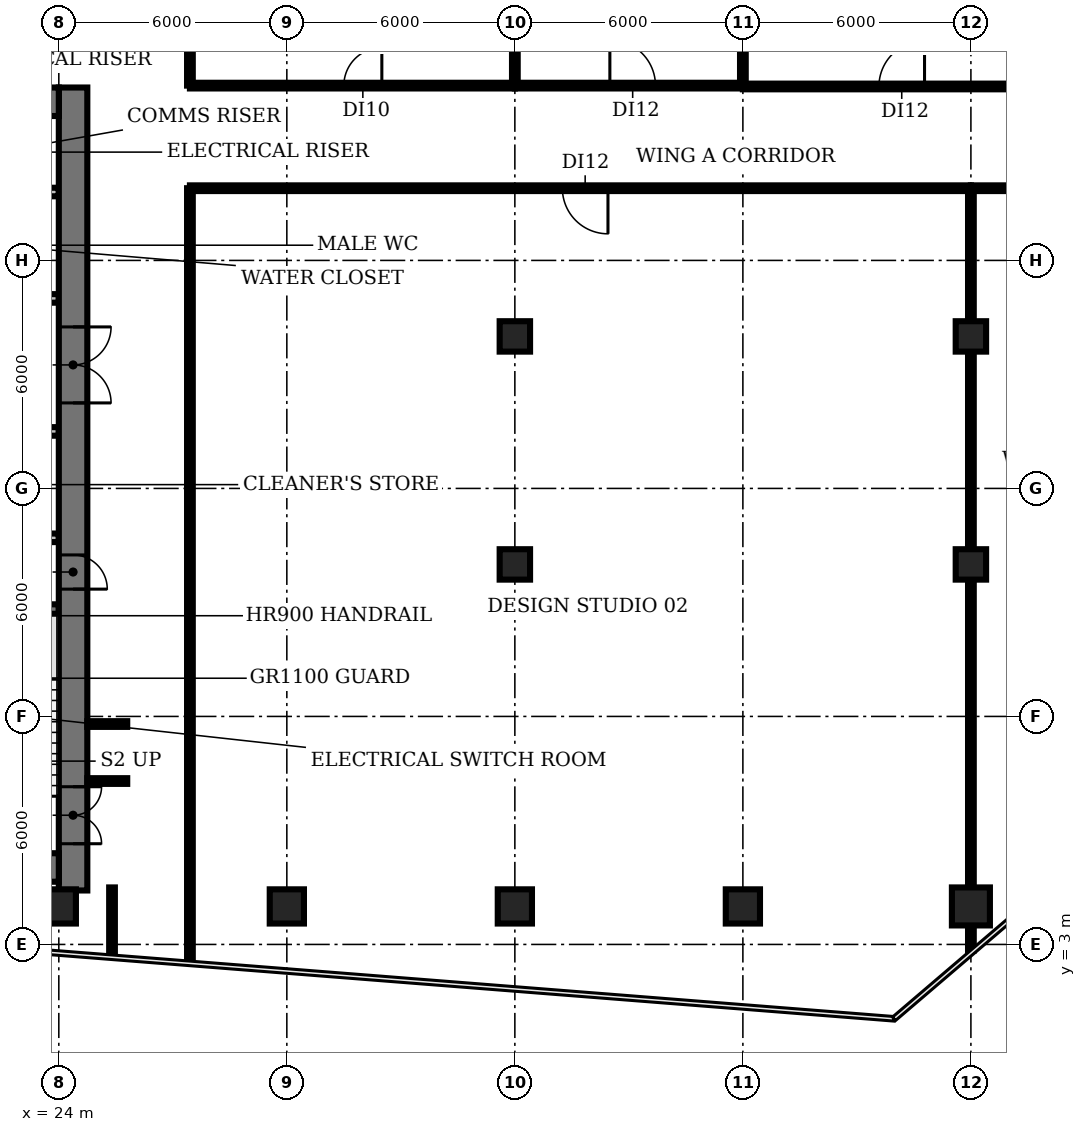
"""IFC4 building model, lengths in metres.
Left out: names, types, materials, properties, quantities, classifications, styles, units other than length and angle.
Written with IfcOpenShell. Run it as: python <this file> out.ifc"""

import sys

from ifc_helpers import new_model, si_unit, direction, frame, frame_2d, origin, origin_2d, place, context, subcontext, project, spatial, rectangle, circle, extrude, element, fill, save


model = new_model("IFC4")
c1 = context("Model", 3, precision=1e-05, world=origin(), true_north=direction((0.0, 1.0)))
c2 = subcontext(c1, "Body", "Model", "MODEL_VIEW")
j1 = project(units=[si_unit("LENGTHUNIT", "METRE"), si_unit("PLANEANGLEUNIT", "RADIAN")], contexts=[c1])
p1 = place(None, origin())
s1 = spatial("IfcSite", under=j1, at=p1, CompositionType="ELEMENT")
p2 = place(p1, origin())
s2 = spatial("IfcBuilding", under=s1, at=p2, CompositionType="ELEMENT")
p3 = place(p2, frame((0.0, 0.0, 129.8)))
s3 = spatial("IfcBuildingStorey", under=s2, at=p3, CompositionType="ELEMENT", Elevation=129.8)
for number, where, z_axis, x_axis in (
    (1, (24.0, 4.0, 0.0), (0.0, 0.0, 1.0), (1.0, 0.0, 0.0)),
    (2, (30.0, 4.0, 0.0), (0.0, 0.0, 1.0), (1.0, 0.0, 0.0)),
    (3, (36.0, 4.0, 0.0), (0.0, 0.0, 1.0), (1.0, 0.0, 0.0)),
):
    element("IfcColumn", number, at=place(p3, frame(where, z_axis=z_axis, x_axis=x_axis)), inside=s3, PredefinedType="COLUMN", context=c2, shape_type="SweptSolid", body=[
        extrude(rectangle(XDim=0.9, YDim=0.9, at=origin_2d()), origin(), (0.0, 0.0, 1.0), 3.85),
    ])
for number, where, z_axis, x_axis in (
    (4, (36.0, 13.0, 0.0), (0.0, 0.0, 1.0), (1.0, 0.0, 0.0)),
    (5, (36.0, 19.0, 0.0), (0.0, 0.0, 1.0), (1.0, 0.0, 0.0)),
):
    element("IfcColumn", number, at=place(p3, frame(where, z_axis=z_axis, x_axis=x_axis)), inside=s3, PredefinedType="COLUMN", context=c2, shape_type="SweptSolid", body=[
        extrude(rectangle(XDim=0.8, YDim=0.8, at=origin_2d()), origin(), (0.0, 0.0, 1.0), 3.85),
    ])
p4 = place(p3, frame((42.0, 4.0, 0.0), z_axis=(0.0, 0.0, 1.0), x_axis=(1.0, 0.0, 0.0)))
e6 = element("IfcColumn", 6, at=p4, inside=s3, PredefinedType="COLUMN", context=c2, shape_type="SweptSolid", body=[
    extrude(rectangle(XDim=0.9, YDim=0.9, at=origin_2d()), origin(), (0.0, 0.0, 1.0), 3.85),
])
p5 = place(p3, frame((48.0, 4.0, 0.0), z_axis=(0.0, 0.0, 1.0), x_axis=(1.0, 0.0, 0.0)))
e7 = element("IfcColumn", 7, at=p5, inside=s3, PredefinedType="COLUMN", context=c2, shape_type="SweptSolid", body=[
    extrude(circle(Radius=0.5, at=origin_2d()), origin(), (0.0, 0.0, 1.0), 3.85),
])
for number, where, z_axis, x_axis in (
    (8, (48.0, 13.0, 0.0), (0.0, 0.0, 1.0), (1.0, 0.0, 0.0)),
    (9, (48.0, 19.0, 0.0), (0.0, 0.0, 1.0), (1.0, 0.0, 0.0)),
):
    element("IfcColumn", number, at=place(p3, frame(where, z_axis=z_axis, x_axis=x_axis)), inside=s3, PredefinedType="COLUMN", context=c2, shape_type="SweptSolid", body=[
        extrude(rectangle(XDim=0.8, YDim=0.8, at=origin_2d()), origin(), (0.0, 0.0, 1.0), 3.85),
    ])
p6 = place(p3, frame((20.85, 11.825, 0.0), z_axis=(0.0, 0.0, 1.0), x_axis=(1.0, 0.0, 0.0)))
e10 = element("IfcWall", 10, at=p6, inside=s3, PredefinedType="SHEAR", context=c2, shape_type="SweptSolid", body=[
    extrude(rectangle(XDim=3.15, YDim=0.25, at=frame_2d((1.575, 0.0))), origin(), (0.0, 0.0, 1.0), 3.85),
])
p7 = place(p3, frame((16.6, 13.7, 0.0), z_axis=(0.0, 0.0, 1.0), x_axis=(1.0, 0.0, 0.0)))
e11 = element("IfcWall", 11, at=p7, inside=s3, PredefinedType="PARTITIONING", context=c2, shape_type="SweptSolid", body=[
    extrude(rectangle(XDim=7.4, YDim=0.225, at=frame_2d((3.7, 0.0))), origin(), (0.0, 0.0, 1.0), 3.85),
])
p8 = place(p3, frame((9.4, 16.5, 0.0), z_axis=(0.0, 0.0, 1.0), x_axis=(1.0, 0.0, 0.0)))
e12 = element("IfcWall", 12, at=p8, inside=s3, PredefinedType="PARTITIONING", context=c2, shape_type="SweptSolid", body=[
    extrude(rectangle(XDim=14.6, YDim=0.225, at=frame_2d((7.3, 0.0))), origin(), (0.0, 0.0, 1.0), 3.85),
])
p9 = place(p8, frame((0.75, 0.0, 0.0)))
e13 = element("IfcOpeningElement", 13, at=p9, cuts=e12, PredefinedType="OPENING", context=c2, shape_type="SweptSolid", body=[
    extrude(rectangle(XDim=1.1, YDim=2.1, at=frame_2d((0.55, 1.05))), frame((0.0, 0.123, 0.0), z_axis=(0.0, -1.0, 0.0), x_axis=(1.0, 0.0, 0.0)), (0.0, 0.0, 1.0), 0.245),
])
p10 = place(p8, frame((3.55, 0.0, 0.0)))
e14 = element("IfcOpeningElement", 14, at=p10, cuts=e12, PredefinedType="OPENING", context=c2, shape_type="SweptSolid", body=[
    extrude(rectangle(XDim=1.1, YDim=2.1, at=frame_2d((0.55, 1.05))), frame((0.0, 0.123, 0.0), z_axis=(0.0, -1.0, 0.0), x_axis=(1.0, 0.0, 0.0)), (0.0, 0.0, 1.0), 0.245),
])
p11 = place(p8, frame((6.35, 0.0, 0.0)))
e15 = element("IfcOpeningElement", 15, at=p11, cuts=e12, PredefinedType="OPENING", context=c2, shape_type="SweptSolid", body=[
    extrude(rectangle(XDim=1.1, YDim=2.1, at=frame_2d((0.55, 1.05))), frame((0.0, 0.123, 0.0), z_axis=(0.0, -1.0, 0.0), x_axis=(1.0, 0.0, 0.0)), (0.0, 0.0, 1.0), 0.245),
])
p12 = place(p8, frame((9.15, 0.0, 0.0)))
e16 = element("IfcOpeningElement", 16, at=p12, cuts=e12, PredefinedType="OPENING", context=c2, shape_type="SweptSolid", body=[
    extrude(rectangle(XDim=1.1, YDim=2.1, at=frame_2d((0.55, 1.05))), frame((0.0, 0.123, 0.0), z_axis=(0.0, -1.0, 0.0), x_axis=(1.0, 0.0, 0.0)), (0.0, 0.0, 1.0), 0.245),
])
p13 = place(p8, frame((12.4, 0.0, 0.0)))
e17 = element("IfcOpeningElement", 17, at=p13, cuts=e12, PredefinedType="OPENING", context=c2, shape_type="SweptSolid", body=[
    extrude(rectangle(XDim=1.0, YDim=2.1, at=frame_2d((0.5, 1.05))), frame((0.0, 0.123, 0.0), z_axis=(0.0, -1.0, 0.0), x_axis=(1.0, 0.0, 0.0)), (0.0, 0.0, 1.0), 0.245),
])
p14 = place(p3, frame((24.0, 20.0, 0.0), z_axis=(0.0, 0.0, 1.0), x_axis=(-1.0, 0.0, 0.0)))
e18 = element("IfcWall", 18, at=p14, inside=s3, PredefinedType="PARTITIONING", context=c2, shape_type="SweptSolid", body=[
    extrude(rectangle(XDim=14.6, YDim=0.225, at=frame_2d((7.3, 0.0))), origin(), (0.0, 0.0, 1.0), 3.85),
])
p15 = place(p14, frame((12.5, 0.0, 0.0)))
e19 = element("IfcOpeningElement", 19, at=p15, cuts=e18, PredefinedType="OPENING", context=c2, shape_type="SweptSolid", body=[
    extrude(rectangle(XDim=1.0, YDim=2.1, at=frame_2d((0.5, 1.05))), frame((0.0, 0.123, 0.0), z_axis=(0.0, -1.0, 0.0), x_axis=(1.0, 0.0, 0.0)), (0.0, 0.0, 1.0), 0.245),
])
p16 = place(p14, frame((8.825, 0.0, 0.0)))
e20 = element("IfcOpeningElement", 20, at=p16, cuts=e18, PredefinedType="OPENING", context=c2, shape_type="SweptSolid", body=[
    extrude(rectangle(XDim=1.0, YDim=2.1, at=frame_2d((0.5, 1.05))), frame((0.0, 0.123, 0.0), z_axis=(0.0, -1.0, 0.0), x_axis=(1.0, 0.0, 0.0)), (0.0, 0.0, 1.0), 0.245),
])
p17 = place(p14, frame((4.925, 0.0, 0.0)))
e21 = element("IfcOpeningElement", 21, at=p17, cuts=e18, PredefinedType="OPENING", context=c2, shape_type="SweptSolid", body=[
    extrude(rectangle(XDim=1.0, YDim=2.1, at=frame_2d((0.5, 1.05))), frame((0.0, 0.123, 0.0), z_axis=(0.0, -1.0, 0.0), x_axis=(1.0, 0.0, 0.0)), (0.0, 0.0, 1.0), 0.245),
])
p18 = place(p14, frame((1.2, 0.0, 0.0)))
e22 = element("IfcOpeningElement", 22, at=p18, cuts=e18, PredefinedType="OPENING", context=c2, shape_type="SweptSolid", body=[
    extrude(rectangle(XDim=1.0, YDim=2.1, at=frame_2d((0.5, 1.05))), frame((0.0, 0.123, 0.0), z_axis=(0.0, -1.0, 0.0), x_axis=(1.0, 0.0, 0.0)), (0.0, 0.0, 1.0), 0.245),
])
p19 = place(p3, frame((9.4, 22.8, 0.0), z_axis=(0.0, 0.0, 1.0), x_axis=(1.0, 0.0, 0.0)))
e23 = element("IfcWall", 23, at=p19, inside=s3, PredefinedType="PARTITIONING", context=c2, shape_type="SweptSolid", body=[
    extrude(rectangle(XDim=14.6, YDim=0.225, at=frame_2d((7.3, 0.0))), origin(), (0.0, 0.0, 1.0), 3.85),
])
p20 = place(p3, frame((24.375, 25.55, 0.0), z_axis=(0.0, 0.0, 1.0), x_axis=(0.0, -1.0, 0.0)))
e24 = element("IfcWall", 24, at=p20, inside=s3, PredefinedType="SHEAR", context=c2, shape_type="SweptSolid", body=[
    extrude(rectangle(XDim=21.13, YDim=0.75, at=frame_2d((10.565, 0.0))), origin(), (0.0, 0.0, 1.0), 3.85),
])
p21 = place(p20, frame((18.4, 0.0, 0.0)))
e25 = element("IfcOpeningElement", 25, at=p21, cuts=e24, PredefinedType="OPENING", context=c2, shape_type="SweptSolid", body=[
    extrude(rectangle(XDim=1.5, YDim=2.1, at=frame_2d((0.75, 1.05))), frame((0.0, 0.385, 0.0), z_axis=(0.0, -1.0, 0.0), x_axis=(1.0, 0.0, 0.0)), (0.0, 0.0, 1.0), 0.77),
])
p22 = place(p20, frame((12.3, 0.0, 0.0)))
e26 = element("IfcOpeningElement", 26, at=p22, cuts=e24, PredefinedType="OPENING", context=c2, shape_type="SweptSolid", body=[
    extrude(rectangle(XDim=0.9, YDim=2.1, at=frame_2d((0.45, 1.05))), frame((0.0, 0.385, 0.0), z_axis=(0.0, -1.0, 0.0), x_axis=(1.0, 0.0, 0.0)), (0.0, 0.0, 1.0), 0.77),
])
p23 = place(p20, frame((6.3, 0.0, 0.0)))
e27 = element("IfcOpeningElement", 27, at=p23, cuts=e24, PredefinedType="OPENING", context=c2, shape_type="SweptSolid", body=[
    extrude(rectangle(XDim=2.0, YDim=2.1, at=frame_2d((1.0, 1.05))), frame((0.0, 0.385, 0.0), z_axis=(0.0, -1.0, 0.0), x_axis=(1.0, 0.0, 0.0)), (0.0, 0.0, 1.0), 0.77),
])
p24 = place(p3, frame((24.0, 5.025, 0.0), z_axis=(0.0, 0.0, 1.0), x_axis=(-1.0, 0.0, 0.0)))
e28 = element("IfcWall", 28, at=p24, inside=s3, PredefinedType="SHEAR", context=c2, shape_type="SweptSolid", body=[
    extrude(rectangle(XDim=18.0, YDim=0.75, at=frame_2d((9.0, 0.0))), origin(), (0.0, 0.0, 1.0), 3.85),
])
p25 = place(p24, frame((0.825, 0.0, 0.0)))
e29 = element("IfcOpeningElement", 29, at=p25, cuts=e28, PredefinedType="OPENING", context=c2, shape_type="SweptSolid", body=[
    extrude(rectangle(XDim=1.5, YDim=2.1, at=frame_2d((0.75, 1.05))), frame((0.0, 0.385, 0.0), z_axis=(0.0, -1.0, 0.0), x_axis=(1.0, 0.0, 0.0)), (0.0, 0.0, 1.0), 0.77),
])
p26 = place(p24, frame((15.675, 0.0, 0.0)))
e30 = element("IfcOpeningElement", 30, at=p26, cuts=e28, PredefinedType="OPENING", context=c2, shape_type="SweptSolid", body=[
    extrude(rectangle(XDim=1.5, YDim=2.1, at=frame_2d((0.75, 1.05))), frame((0.0, 0.385, 0.0), z_axis=(0.0, -1.0, 0.0), x_axis=(1.0, 0.0, 0.0)), (0.0, 0.0, 1.0), 0.77),
])
p27 = place(p24, frame((13.0, 0.0, 0.0)))
e31 = element("IfcOpeningElement", 31, at=p27, cuts=e28, PredefinedType="OPENING", context=c2, shape_type="SweptSolid", body=[
    extrude(rectangle(XDim=1.2, YDim=2.1, at=frame_2d((0.6, 1.05))), frame((0.0, 0.385, 0.0), z_axis=(0.0, -1.0, 0.0), x_axis=(1.0, 0.0, 0.0)), (0.0, 0.0, 1.0), 0.77),
])
p28 = place(p24, frame((4.35, 0.0, 0.0)))
e32 = element("IfcOpeningElement", 32, at=p28, cuts=e28, PredefinedType="OPENING", context=c2, shape_type="SweptSolid", body=[
    extrude(rectangle(XDim=1.0, YDim=2.1, at=frame_2d((0.5, 1.05))), frame((0.0, 0.385, 0.0), z_axis=(0.0, -1.0, 0.0), x_axis=(1.0, 0.0, 0.0)), (0.0, 0.0, 1.0), 0.77),
])
p29 = place(p3, frame((6.0, 25.175, 0.0), z_axis=(0.0, 0.0, 1.0), x_axis=(1.0, 0.0, 0.0)))
e33 = element("IfcWall", 33, at=p29, inside=s3, PredefinedType="SHEAR", context=c2, shape_type="SweptSolid", body=[
    extrude(rectangle(XDim=18.0, YDim=0.75, at=frame_2d((9.0, 0.0))), origin(), (0.0, 0.0, 1.0), 3.85),
])
for number, where, z_axis, x_axis in (
    (34, (24.75, 7.3, 0.0), (0.0, 0.0, 1.0), (1.0, 0.0, 0.0)),
    (35, (24.75, 8.8, 0.0), (0.0, 0.0, 1.0), (1.0, 0.0, 0.0)),
):
    element("IfcWall", number, at=place(p3, frame(where, z_axis=z_axis, x_axis=x_axis)), inside=s3, PredefinedType="PARTITIONING", context=c2, shape_type="SweptSolid", body=[
        extrude(rectangle(XDim=1.05, YDim=0.15, at=frame_2d((0.525, 0.0))), origin(), (0.0, 0.0, 1.0), 2.83),
    ])
p30 = place(p3, frame((25.4, 2.71, 0.0), z_axis=(0.0, 0.0, 1.0), x_axis=(0.0, 1.0, 0.0)))
e36 = element("IfcWall", 36, at=p30, inside=s3, PredefinedType="PARTITIONING", context=c2, shape_type="SweptSolid", body=[
    extrude(rectangle(XDim=1.79, YDim=0.15, at=frame_2d((0.895, 0.0))), origin(), (0.0, 0.0, 1.0), 2.83),
])
p31 = place(p3, frame((27.45, 2.55, 0.0), z_axis=(0.0, 0.0, 1.0), x_axis=(0.0, 1.0, 0.0)))
e37 = element("IfcWall", 37, at=p31, inside=s3, PredefinedType="PARTITIONING", context=c2, shape_type="SweptSolid", body=[
    extrude(rectangle(XDim=20.35, YDim=0.15, at=frame_2d((10.175, 0.0))), origin(), (0.0, 0.0, 1.0), 2.83),
])
p32 = place(p3, frame((27.45, 25.6, 0.0), z_axis=(0.0, 0.0, 1.0), x_axis=(0.0, 1.0, 0.0)))
e38 = element("IfcWall", 38, at=p32, inside=s3, PredefinedType="PARTITIONING", context=c2, shape_type="SweptSolid", body=[
    extrude(rectangle(XDim=3.85, YDim=0.15, at=frame_2d((1.925, 0.0))), origin(), (0.0, 0.0, 1.0), 2.83),
])
p33 = place(p3, frame((27.45, 25.6, 0.0), z_axis=(0.0, 0.0, 1.0), x_axis=(1.0, 0.0, 0.0)))
e39 = element("IfcWall", 39, at=p33, inside=s3, PredefinedType="PARTITIONING", context=c2, shape_type="SweptSolid", body=[
    extrude(rectangle(XDim=8.55, YDim=0.15, at=frame_2d((4.275, 0.0))), origin(), (0.0, 0.0, 1.0), 2.83),
])
p34 = place(p33, frame((4.05, 0.0, 0.0)))
e40 = element("IfcOpeningElement", 40, at=p34, cuts=e39, PredefinedType="OPENING", context=c2, shape_type="SweptSolid", body=[
    extrude(rectangle(XDim=1.0, YDim=2.1, at=frame_2d((0.5, 1.05))), frame((0.0, 0.085, 0.0), z_axis=(0.0, -1.0, 0.0), x_axis=(1.0, 0.0, 0.0)), (0.0, 0.0, 1.0), 0.17),
])
p35 = place(p3, frame((36.0, 25.6, 0.0), z_axis=(0.0, 0.0, 1.0), x_axis=(0.0, 1.0, 0.0)))
e41 = element("IfcWall", 41, at=p35, inside=s3, PredefinedType="PARTITIONING", context=c2, shape_type="SweptSolid", body=[
    extrude(rectangle(XDim=3.38, YDim=0.15, at=frame_2d((1.69, 0.0))), origin(), (0.0, 0.0, 1.0), 2.83),
])
p36 = place(p3, frame((36.0, 25.6, 0.0), z_axis=(0.0, 0.0, 1.0), x_axis=(1.0, 0.0, 0.0)))
e42 = element("IfcWall", 42, at=p36, inside=s3, PredefinedType="PARTITIONING", context=c2, shape_type="SweptSolid", body=[
    extrude(rectangle(XDim=6.0, YDim=0.15, at=frame_2d((3.0, 0.0))), origin(), (0.0, 0.0, 1.0), 2.83),
])
p37 = place(p36, frame((2.5, 0.0, 0.0)))
e43 = element("IfcOpeningElement", 43, at=p37, cuts=e42, PredefinedType="OPENING", context=c2, shape_type="SweptSolid", body=[
    extrude(rectangle(XDim=1.2, YDim=2.1, at=frame_2d((0.6, 1.05))), frame((0.0, 0.085, 0.0), z_axis=(0.0, -1.0, 0.0), x_axis=(1.0, 0.0, 0.0)), (0.0, 0.0, 1.0), 0.17),
])
p38 = place(p3, frame((42.0, 25.577, 0.0), z_axis=(0.0, 0.0, 1.0), x_axis=(1.0, 0.0, 0.0)))
e44 = element("IfcWall", 44, at=p38, inside=s3, PredefinedType="PARTITIONING", context=c2, shape_type="SweptSolid", body=[
    extrude(rectangle(XDim=9.78, YDim=0.15, at=frame_2d((4.89, 0.0))), origin(), (0.0, 0.0, 1.0), 2.83),
])
p39 = place(p38, frame((3.58, 0.0, 0.0)))
e45 = element("IfcOpeningElement", 45, at=p39, cuts=e44, PredefinedType="OPENING", context=c2, shape_type="SweptSolid", body=[
    extrude(rectangle(XDim=1.2, YDim=2.1, at=frame_2d((0.6, 1.05))), frame((0.0, 0.085, 0.0), z_axis=(0.0, -1.0, 0.0), x_axis=(1.0, 0.0, 0.0)), (0.0, 0.0, 1.0), 0.17),
])
p40 = place(p3, frame((42.0, 25.6, 0.0), z_axis=(0.0, 0.0, 1.0), x_axis=(0.0, 1.0, 0.0)))
e46 = element("IfcWall", 46, at=p40, inside=s3, PredefinedType="PARTITIONING", context=c2, shape_type="SweptSolid", body=[
    extrude(rectangle(XDim=3.38, YDim=0.15, at=frame_2d((1.69, 0.0))), origin(), (0.0, 0.0, 1.0), 2.83),
])
p41 = place(p3, frame((48.0, 2.84, 0.0), z_axis=(0.0, 0.0, 1.0), x_axis=(0.0, 1.0, 0.0)))
e47 = element("IfcWall", 47, at=p41, inside=s3, PredefinedType="PARTITIONING", context=c2, shape_type="SweptSolid", body=[
    extrude(rectangle(XDim=20.06, YDim=0.15, at=frame_2d((10.03, 0.0))), origin(), (0.0, 0.0, 1.0), 2.83),
])
p42 = place(p3, frame((48.0, 22.9, 0.0), z_axis=(0.0, 0.0, 1.0), x_axis=(-1.0, 0.0, 0.0)))
e48 = element("IfcWall", 48, at=p42, inside=s3, PredefinedType="PARTITIONING", context=c2, shape_type="SweptSolid", body=[
    extrude(rectangle(XDim=20.55, YDim=0.15, at=frame_2d((10.275, 0.0))), origin(), (0.0, 0.0, 1.0), 2.83),
])
p43 = place(p42, frame((9.55, 0.0, 0.0)))
e49 = element("IfcOpeningElement", 49, at=p43, cuts=e48, PredefinedType="OPENING", context=c2, shape_type="SweptSolid", body=[
    extrude(rectangle(XDim=1.2, YDim=2.1, at=frame_2d((0.6, 1.05))), frame((0.0, 0.085, 0.0), z_axis=(0.0, -1.0, 0.0), x_axis=(1.0, 0.0, 0.0)), (0.0, 0.0, 1.0), 0.17),
])
p44 = place(p3, frame((51.88, 22.9, 0.0), z_axis=(0.0, 0.0, 1.0), x_axis=(-1.0, 0.0, 0.0)))
e50 = element("IfcWall", 50, at=p44, inside=s3, PredefinedType="PARTITIONING", context=c2, shape_type="SweptSolid", body=[
    extrude(rectangle(XDim=3.88, YDim=0.15, at=frame_2d((1.94, 0.0))), origin(), (0.0, 0.0, 1.0), 2.83),
])
p45 = place(p44, frame((1.28, 0.0, 0.0)))
e51 = element("IfcOpeningElement", 51, at=p45, cuts=e50, PredefinedType="OPENING", context=c2, shape_type="SweptSolid", body=[
    extrude(rectangle(XDim=1.2, YDim=2.1, at=frame_2d((0.6, 1.05))), frame((0.0, 0.085, 0.0), z_axis=(0.0, -1.0, 0.0), x_axis=(1.0, 0.0, 0.0)), (0.0, 0.0, 1.0), 0.17),
])
p46 = place(p21, origin())
e52 = element("IfcDoor", 52, at=p46, inside=s3, OperationType="DOUBLE_DOOR_SINGLE_SWING", PredefinedType="DOOR", context=c2, shape_type="SweptSolid", body=[
    extrude(rectangle(XDim=1.5, YDim=2.1, at=frame_2d((0.75, 1.05))), frame((0.0, 0.025, 0.0), z_axis=(0.0, -1.0, 0.0), x_axis=(1.0, 0.0, 0.0)), (0.0, 0.0, 1.0), 0.05),
])
fill(e25, e52)
p47 = place(p22, origin())
e53 = element("IfcDoor", 53, at=p47, inside=s3, OperationType="SINGLE_SWING_RIGHT", PredefinedType="DOOR", context=c2, shape_type="SweptSolid", body=[
    extrude(rectangle(XDim=0.9, YDim=2.1, at=frame_2d((0.45, 1.05))), frame((0.0, -0.315, 0.0), z_axis=(0.0, -1.0, 0.0), x_axis=(1.0, 0.0, 0.0)), (0.0, 0.0, 1.0), 0.05),
])
fill(e26, e53)
p48 = place(p23, origin())
e54 = element("IfcDoor", 54, at=p48, inside=s3, OperationType="DOUBLE_DOOR_SINGLE_SWING", PredefinedType="DOOR", context=c2, shape_type="SweptSolid", body=[
    extrude(rectangle(XDim=2.0, YDim=2.1, at=frame_2d((1.0, 1.05))), frame((0.0, 0.025, 0.0), z_axis=(0.0, -1.0, 0.0), x_axis=(1.0, 0.0, 0.0)), (0.0, 0.0, 1.0), 0.05),
])
fill(e27, e54)
p49 = place(p34, origin())
e55 = element("IfcDoor", 55, at=p49, inside=s3, OperationType="SINGLE_SWING_RIGHT", PredefinedType="DOOR", context=c2, shape_type="SweptSolid", body=[
    extrude(rectangle(XDim=1.0, YDim=2.1, at=frame_2d((0.5, 1.05))), frame((0.0, 0.025, 0.0), z_axis=(0.0, -1.0, 0.0), x_axis=(1.0, 0.0, 0.0)), (0.0, 0.0, 1.0), 0.05),
])
fill(e40, e55)
p50 = place(p37, origin())
e56 = element("IfcDoor", 56, at=p50, inside=s3, OperationType="SINGLE_SWING_LEFT", PredefinedType="DOOR", context=c2, shape_type="SweptSolid", body=[
    extrude(rectangle(XDim=1.2, YDim=2.1, at=frame_2d((0.6, 1.05))), frame((0.0, 0.025, 0.0), z_axis=(0.0, -1.0, 0.0), x_axis=(1.0, 0.0, 0.0)), (0.0, 0.0, 1.0), 0.05),
])
fill(e43, e56)
p51 = place(p39, origin())
e57 = element("IfcDoor", 57, at=p51, inside=s3, OperationType="SINGLE_SWING_RIGHT", PredefinedType="DOOR", context=c2, shape_type="SweptSolid", body=[
    extrude(rectangle(XDim=1.2, YDim=2.1, at=frame_2d((0.6, 1.05))), frame((0.0, 0.025, 0.0), z_axis=(0.0, -1.0, 0.0), x_axis=(1.0, 0.0, 0.0)), (0.0, 0.0, 1.0), 0.05),
])
fill(e45, e57)
p52 = place(p43, origin())
e58 = element("IfcDoor", 58, at=p52, inside=s3, OperationType="SINGLE_SWING_LEFT", PredefinedType="DOOR", context=c2, shape_type="SweptSolid", body=[
    extrude(rectangle(XDim=1.2, YDim=2.1, at=frame_2d((0.6, 1.05))), frame((0.0, 0.025, 0.0), z_axis=(0.0, -1.0, 0.0), x_axis=(1.0, 0.0, 0.0)), (0.0, 0.0, 1.0), 0.05),
])
fill(e49, e58)
save(model, sys.argv[1])
